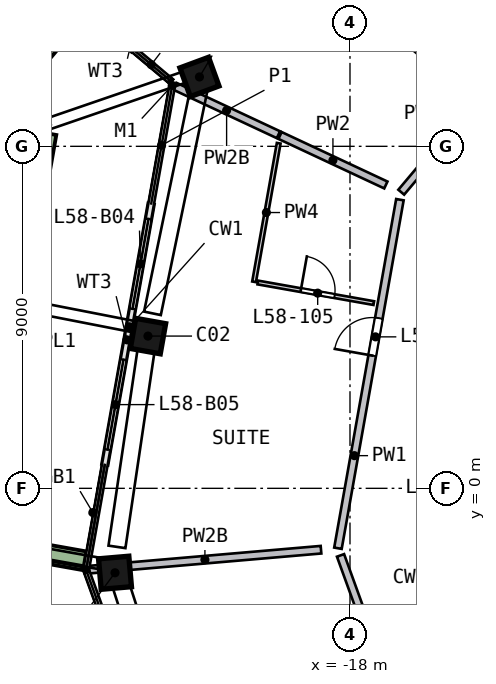
"""IFC4 building model, lengths in metres.
Left out: names, types, materials, properties, quantities, classifications, styles, units other than length and angle.
Written with IfcOpenShell. Run it as: python <this file> out.ifc"""

import sys

from ifc_helpers import new_model, si_unit, direction, frame, frame_2d, origin, origin_2d, place, context, subcontext, project, spatial, rectangle, extrude, element, fill, save


model = new_model("IFC4")
c1 = context("Model", 3, precision=1e-05, world=origin(), true_north=direction((0.0, 1.0)))
c2 = subcontext(c1, "Body", "Model", "MODEL_VIEW")
j1 = project(units=[si_unit("LENGTHUNIT", "METRE"), si_unit("PLANEANGLEUNIT", "RADIAN")], contexts=[c1])
p1 = place(None, origin())
s1 = spatial("IfcSite", under=j1, at=p1, CompositionType="ELEMENT")
p2 = place(p1, origin())
s2 = spatial("IfcBuilding", under=s1, at=p2, CompositionType="ELEMENT")
p3 = place(p2, frame((0.0, 0.0, 237.5)))
s3 = spatial("IfcBuildingStorey", under=s2, at=p3, CompositionType="ELEMENT", Elevation=237.5)
p4 = place(p3, frame((-21.899, 10.952, 0.0), z_axis=(-0.051233202, -0.104594786, 0.993194387), x_axis=(-0.345877512, 0.934811029, 0.08060451)))
e1 = element("IfcColumn", 1, at=p4, inside=s3, PredefinedType="COLUMN", context=c2, shape_type="SweptSolid", body=[
    extrude(rectangle(XDim=0.8, YDim=0.8, at=origin_2d()), origin(), (0.0, 0.0, 1.0), 3.212),
])
p5 = place(p3, frame((-23.293, 4.141, 0.0), z_axis=(-0.018783788, -0.111029677, 0.993639562), x_axis=(-0.174054393, -0.978276827, -0.112603368)))
e2 = element("IfcColumn", 2, at=p5, inside=s3, PredefinedType="COLUMN", context=c2, shape_type="SweptSolid", body=[
    extrude(rectangle(XDim=0.8, YDim=0.8, at=origin_2d()), origin(), (0.0, 0.0, 1.0), 3.21),
])
p6 = place(p3, frame((-24.196, -2.083, 0.0), z_axis=(0.010795228, -0.114946373, 0.993313039), x_axis=(-0.084478949, 0.98971463, 0.115448074)))
e3 = element("IfcColumn", 3, at=p6, inside=s3, PredefinedType="COLUMN", context=c2, shape_type="SweptSolid", body=[
    extrude(rectangle(XDim=0.8, YDim=0.8, at=origin_2d()), origin(), (0.0, 0.0, 1.0), 3.211),
])
p7 = place(p3, frame((-23.232, 7.482, 0.0), z_axis=(0.0, 0.0, 1.0), x_axis=(-0.175042897, -0.984560808, 0.0)))
e4 = element("IfcWall", 4, at=p7, inside=s3, PredefinedType="SOLIDWALL", context=c2, shape_type="SweptSolid", body=[
    extrude(rectangle(XDim=3.3, YDim=0.15, at=frame_2d((1.65, 0.0))), origin(), (0.0, 0.0, 1.0), 2.525),
])
p8 = place(p7, frame((0.4, 0.0, 0.0)))
e5 = element("IfcOpeningElement", 5, at=p8, cuts=e4, PredefinedType="OPENING", context=c2, shape_type="SweptSolid", body=[
    extrude(rectangle(XDim=2.4, YDim=2.4, at=frame_2d((1.2, 1.2))), frame((0.0, 0.085, 0.0), z_axis=(0.0, -1.0, 0.0), x_axis=(1.0, 0.0, 0.0)), (0.0, 0.0, 1.0), 0.17),
])
p9 = place(p3, frame((-23.81, 4.233, 0.0), z_axis=(0.0, 0.0, 1.0), x_axis=(-0.175040517, -0.984561231, 0.0)))
e6 = element("IfcWall", 6, at=p9, inside=s3, PredefinedType="SOLIDWALL", context=c2, shape_type="SweptSolid", body=[
    extrude(rectangle(XDim=3.661, YDim=0.15, at=frame_2d((1.831, 0.0))), origin(), (0.0, 0.0, 1.0), 2.525),
])
p10 = place(p9, frame((0.861, 0.0, 0.0)))
e7 = element("IfcOpeningElement", 7, at=p10, cuts=e6, PredefinedType="OPENING", context=c2, shape_type="SweptSolid", body=[
    extrude(rectangle(XDim=2.4, YDim=2.4, at=frame_2d((1.2, 1.2))), frame((0.0, 0.085, 0.0), z_axis=(0.0, -1.0, 0.0), x_axis=(1.0, 0.0, 0.0)), (0.0, 0.0, 1.0), 0.17),
])
p11 = place(p3, frame((-25.108, 12.632, 0.0), z_axis=(0.0, 0.0, 1.0), x_axis=(-0.64382547, -0.765172376, 0.0)))
e8 = element("IfcWall", 8, at=p11, inside=s3, PredefinedType="SOLIDWALL", context=c2, shape_type="SweptSolid", body=[
    extrude(rectangle(XDim=3.199, YDim=0.5, at=frame_2d((1.6, 0.0))), origin(), (0.0, 0.0, 1.0), 0.7),
])
p12 = place(p3, frame((-25.974, 9.343, 0.0), z_axis=(0.0, 0.0, 1.0), x_axis=(-0.175017773, -0.984565274, 0.0)))
e9 = element("IfcWall", 9, at=p12, inside=s3, PredefinedType="SOLIDWALL", context=c2, shape_type="SweptSolid", body=[
    extrude(rectangle(XDim=11.153, YDim=0.5, at=frame_2d((5.576, 0.0))), origin(), (0.0, 0.0, 1.0), 0.7),
])
p13 = place(p3, frame((-27.636, -1.435, 0.0), z_axis=(0.0, 0.0, 1.0), x_axis=(0.984577054, -0.174951491, 0.0)))
e10 = element("IfcWall", 10, at=p13, inside=s3, PredefinedType="SOLIDWALL", context=c2, shape_type="SweptSolid", body=[
    extrude(rectangle(XDim=2.699, YDim=0.5, at=frame_2d((1.349, 0.0))), origin(), (0.0, 0.0, 1.0), 0.7),
])
p14 = place(p3, frame((-18.317, -1.577, 0.0), z_axis=(0.0, 0.0, 1.0), x_axis=(0.175025996, 0.984563812, 0.0)))
e11 = element("IfcWall", 11, at=p14, inside=s3, PredefinedType="SOLIDWALL", context=c2, shape_type="SweptSolid", body=[
    extrude(rectangle(XDim=9.316, YDim=0.2, at=frame_2d((4.658, 0.0))), origin(), (0.0, 0.0, 1.0), 3.19),
])
p15 = place(p14, frame((5.15, 0.0, 0.0)))
e12 = element("IfcOpeningElement", 12, at=p15, cuts=e11, PredefinedType="OPENING", context=c2, shape_type="SweptSolid", body=[
    extrude(rectangle(XDim=1.0, YDim=2.1, at=frame_2d((0.5, 1.05))), frame((0.0, 0.11, 0.0), z_axis=(0.0, -1.0, 0.0), x_axis=(1.0, 0.0, 0.0)), (0.0, 0.0, 1.0), 0.22),
])
p16 = place(p3, frame((-15.143, -10.336, 0.0), z_axis=(0.0, 0.0, 1.0), x_axis=(-0.340697837, 0.940172848, 0.0)))
e13 = element("IfcWall", 13, at=p16, inside=s3, PredefinedType="SOLIDWALL", context=c2, shape_type="SweptSolid", body=[
    extrude(rectangle(XDim=9.116, YDim=0.2, at=frame_2d((4.558, 0.0))), origin(), (0.0, 0.0, 1.0), 3.19),
])
p17 = place(p16, frame((6.458, 0.0, 0.0)))
e14 = element("IfcOpeningElement", 14, at=p17, cuts=e13, PredefinedType="OPENING", context=c2, shape_type="SweptSolid", body=[
    extrude(rectangle(XDim=1.0, YDim=2.1, at=frame_2d((0.5, 1.05))), frame((0.0, 0.11, 0.0), z_axis=(0.0, -1.0, 0.0), x_axis=(1.0, 0.0, 0.0)), (0.0, 0.0, 1.0), 0.22),
])
p18 = place(p3, frame((-16.651, 7.793, 0.0), z_axis=(0.0, 0.0, 1.0), x_axis=(0.64385004, 0.765151702, 0.0)))
e15 = element("IfcWall", 15, at=p18, inside=s3, PredefinedType="SOLIDWALL", context=c2, shape_type="SweptSolid", body=[
    extrude(rectangle(XDim=9.317, YDim=0.2, at=frame_2d((4.658, 0.0))), origin(), (0.0, 0.0, 1.0), 3.19),
])
p19 = place(p18, frame((3.858, 0.0, 0.0)))
e16 = element("IfcOpeningElement", 16, at=p19, cuts=e15, PredefinedType="OPENING", context=c2, shape_type="SweptSolid", body=[
    extrude(rectangle(XDim=1.8, YDim=2.1, at=frame_2d((0.9, 1.05))), frame((0.0, 0.11, 0.0), z_axis=(0.0, -1.0, 0.0), x_axis=(1.0, 0.0, 0.0)), (0.0, 0.0, 1.0), 0.22),
])
p20 = place(p3, frame((-18.763, -1.615, 0.0), z_axis=(0.0, 0.0, 1.0), x_axis=(-0.996312401, -0.085799761, 0.0)))
e17 = element("IfcWall", 17, at=p20, inside=s3, PredefinedType="SOLIDWALL", context=c2, shape_type="SweptSolid", body=[
    extrude(rectangle(XDim=6.132, YDim=0.2, at=frame_2d((3.066, 0.0))), origin(), (0.0, 0.0, 1.0), 2.69),
])
p21 = place(p3, frame((-19.883, 9.305, 0.0), z_axis=(0.0, 0.0, 1.0), x_axis=(-0.905735258, 0.423843889, 0.0)))
e18 = element("IfcWall", 18, at=p21, inside=s3, PredefinedType="SOLIDWALL", context=c2, shape_type="SweptSolid", body=[
    extrude(rectangle(XDim=3.011, YDim=0.2, at=frame_2d((1.506, 0.0))), origin(), (0.0, 0.0, 1.0), 2.69),
])
p22 = place(p3, frame((-14.771, 10.338, 0.0), z_axis=(0.0, 0.0, 1.0), x_axis=(-0.765135633, 0.643869135, 0.0)))
e19 = element("IfcWall", 19, at=p22, inside=s3, PredefinedType="SOLIDWALL", context=c2, shape_type="SweptSolid", body=[
    extrude(rectangle(XDim=13.086, YDim=0.2, at=frame_2d((6.543, 0.0))), origin(), (0.0, 0.0, 1.0), 3.19),
])
p23 = place(p22, frame((4.0, 0.0, 0.0)))
e20 = element("IfcOpeningElement", 20, at=p23, cuts=e19, PredefinedType="OPENING", context=c2, shape_type="SweptSolid", body=[
    extrude(rectangle(XDim=1.0, YDim=2.1, at=frame_2d((0.5, 1.05))), frame((0.0, 0.11, 0.0), z_axis=(0.0, -1.0, 0.0), x_axis=(1.0, 0.0, 0.0)), (0.0, 0.0, 1.0), 0.22),
])
p24 = place(p3, frame((-17.056, 7.983, 0.0), z_axis=(0.0, 0.0, 1.0), x_axis=(-0.90573433, 0.423845871, 0.0)))
e21 = element("IfcWall", 21, at=p24, inside=s3, PredefinedType="SOLIDWALL", context=c2, shape_type="SweptSolid", body=[
    extrude(rectangle(XDim=3.075, YDim=0.2, at=frame_2d((1.537, 0.0))), origin(), (0.0, 0.0, 1.0), 3.19),
])
p25 = place(p3, frame((-20.524, 5.434, 0.0), z_axis=(0.0, 0.0, 1.0), x_axis=(0.17499216, 0.984569827, 0.0)))
e22 = element("IfcWall", 22, at=p25, inside=s3, PredefinedType="PARTITIONING", context=c2, shape_type="SweptSolid", body=[
    extrude(rectangle(XDim=3.704, YDim=0.1, at=frame_2d((1.852, 0.0))), origin(), (0.0, 0.0, 1.0), 3.19),
])
p26 = place(p3, frame((-20.426, 5.417, 0.0), z_axis=(0.0, 0.0, 1.0), x_axis=(0.984556777, -0.175065567, 0.0)))
e23 = element("IfcWall", 23, at=p26, inside=s3, PredefinedType="PARTITIONING", context=c2, shape_type="SweptSolid", body=[
    extrude(rectangle(XDim=3.1, YDim=0.1, at=frame_2d((1.55, 0.0))), origin(), (0.0, 0.0, 1.0), 3.19),
])
p27 = place(p26, frame((1.15, 0.0, 0.0)))
e24 = element("IfcOpeningElement", 24, at=p27, cuts=e23, PredefinedType="OPENING", context=c2, shape_type="SweptSolid", body=[
    extrude(rectangle(XDim=0.9, YDim=2.1, at=frame_2d((0.45, 1.05))), frame((0.0, 0.06, 0.0), z_axis=(0.0, -1.0, 0.0), x_axis=(1.0, 0.0, 0.0)), (0.0, 0.0, 1.0), 0.12),
])
p28 = place(p8, origin())
e25 = element("IfcDoor", 25, at=p28, inside=s3, OperationType="SLIDING_TO_RIGHT", PredefinedType="DOOR", context=c2, shape_type="SweptSolid", body=[
    extrude(rectangle(XDim=2.4, YDim=2.4, at=frame_2d((1.2, 1.2))), frame((0.0, 0.025, 0.0), z_axis=(0.0, -1.0, 0.0), x_axis=(1.0, 0.0, 0.0)), (0.0, 0.0, 1.0), 0.05),
])
fill(e5, e25)
p29 = place(p10, origin())
e26 = element("IfcDoor", 26, at=p29, inside=s3, OperationType="SLIDING_TO_LEFT", PredefinedType="DOOR", context=c2, shape_type="SweptSolid", body=[
    extrude(rectangle(XDim=2.4, YDim=2.4, at=frame_2d((1.2, 1.2))), frame((0.0, 0.025, 0.0), z_axis=(0.0, -1.0, 0.0), x_axis=(1.0, 0.0, 0.0)), (0.0, 0.0, 1.0), 0.05),
])
fill(e7, e26)
p30 = place(p15, origin())
e27 = element("IfcDoor", 27, at=p30, inside=s3, OperationType="SINGLE_SWING_LEFT", PredefinedType="DOOR", context=c2, shape_type="SweptSolid", body=[
    extrude(rectangle(XDim=1.0, YDim=2.1, at=frame_2d((0.5, 1.05))), frame((0.0, 0.025, 0.0), z_axis=(0.0, -1.0, 0.0), x_axis=(1.0, 0.0, 0.0)), (0.0, 0.0, 1.0), 0.05),
])
fill(e12, e27)
p31 = place(p27, origin())
e28 = element("IfcDoor", 28, at=p31, inside=s3, OperationType="SINGLE_SWING_LEFT", PredefinedType="DOOR", context=c2, shape_type="SweptSolid", body=[
    extrude(rectangle(XDim=0.9, YDim=2.1, at=frame_2d((0.45, 1.05))), frame((0.0, 0.025, 0.0), z_axis=(0.0, -1.0, 0.0), x_axis=(1.0, 0.0, 0.0)), (0.0, 0.0, 1.0), 0.05),
])
fill(e24, e28)
save(model, sys.argv[1])
